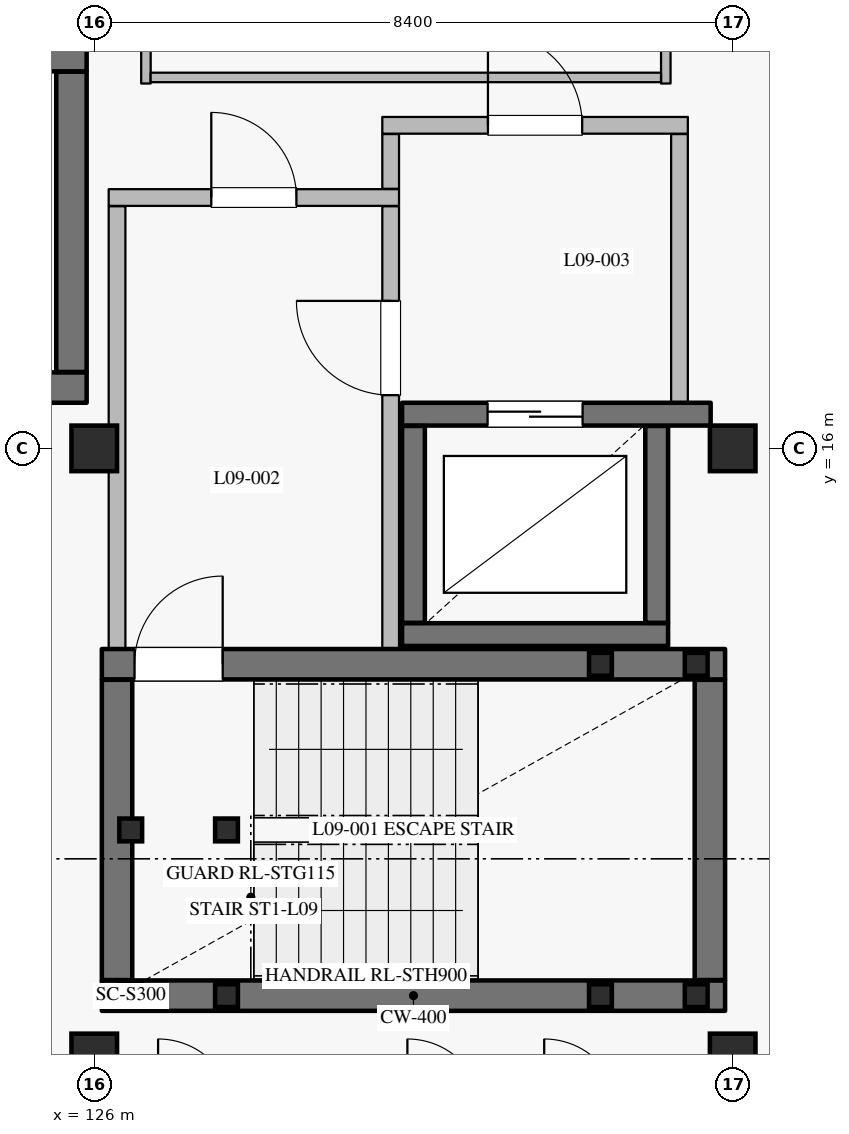
"""IFC4 building model, lengths in metres.
Left out: names, types, materials, properties, quantities, classifications, styles, units other than length and angle.
Written with IfcOpenShell. Run it as: python <this file> out.ifc"""

import sys

from ifc_helpers import new_model, si_unit, direction, frame, frame_2d, origin, origin_2d, place, context, subcontext, project, spatial, rectangle, hollow_rectangle, extrude, element, fill, save


model = new_model("IFC4")
c1 = context("Model", 3, precision=1e-05, world=origin(), true_north=direction((0.0, 1.0)))
c2 = subcontext(c1, "Body", "Model", "MODEL_VIEW")
j1 = project(units=[si_unit("LENGTHUNIT", "METRE"), si_unit("PLANEANGLEUNIT", "RADIAN")], contexts=[c1])
p1 = place(None, origin())
s1 = spatial("IfcSite", under=j1, at=p1, CompositionType="ELEMENT")
p2 = place(p1, origin())
s2 = spatial("IfcBuilding", under=s1, at=p2, CompositionType="ELEMENT")
p3 = place(p2, frame((0.0, 0.0, 39.6)))
s3 = spatial("IfcBuildingStorey", under=s2, at=p3, CompositionType="ELEMENT", Elevation=39.6)
for number, where, z_axis, x_axis in (
    (1, (126.0, 16.0, 0.0), (0.0, 0.0, 1.0), (1.0, 0.0, 0.0)),
    (2, (134.4, 16.0, 0.0), (0.0, 0.0, 1.0), (1.0, 0.0, 0.0)),
    (3, (126.0, 8.0, 0.0), (0.0, 0.0, 1.0), (1.0, 0.0, 0.0)),
    (4, (134.4, 8.0, 0.0), (0.0, 0.0, 1.0), (1.0, 0.0, 0.0)),
):
    element("IfcColumn", number, at=place(p3, frame(where, z_axis=z_axis, x_axis=x_axis)), inside=s3, PredefinedType="COLUMN", context=c2, shape_type="SweptSolid", body=[
        extrude(rectangle(XDim=0.6, YDim=0.6, at=origin_2d()), origin(), (0.0, 0.0, 1.0), 3.6),
    ])
p4 = place(p3, frame((130.05, 13.55, 0.0), z_axis=(0.0, 0.0, 1.0), x_axis=(1.0, 0.0, 0.0)))
e5 = element("IfcWall", 5, at=p4, inside=s3, PredefinedType="SHEAR", context=c2, shape_type="SweptSolid", body=[
    extrude(rectangle(XDim=3.5, YDim=0.3, at=frame_2d((1.75, 0.0))), origin(), (0.0, 0.0, 1.0), 3.335),
])
p5 = place(p3, frame((133.4, 13.705, 0.0), z_axis=(0.0, 0.0, 1.0), x_axis=(0.0, 1.0, 0.0)))
e6 = element("IfcWall", 6, at=p5, inside=s3, PredefinedType="SHEAR", context=c2, shape_type="SweptSolid", body=[
    extrude(rectangle(XDim=2.59, YDim=0.3, at=frame_2d((1.295, 0.0))), origin(), (0.0, 0.0, 1.0), 3.335),
])
p6 = place(p3, frame((134.11, 16.45, 0.0), z_axis=(0.0, 0.0, 1.0), x_axis=(-1.0, 0.0, 0.0)))
e7 = element("IfcWall", 7, at=p6, inside=s3, PredefinedType="SHEAR", context=c2, shape_type="SweptSolid", body=[
    extrude(rectangle(XDim=4.06, YDim=0.3, at=frame_2d((2.03, 0.0))), origin(), (0.0, 0.0, 1.0), 3.335),
])
p7 = place(p6, frame((1.685, 0.0, 0.0)))
e8 = element("IfcOpeningElement", 8, at=p7, cuts=e7, PredefinedType="OPENING", context=c2, shape_type="SweptSolid", body=[
    extrude(rectangle(XDim=1.25, YDim=2.25, at=frame_2d((0.625, 1.125))), frame((0.0, 0.16, 0.0), z_axis=(0.0, -1.0, 0.0), x_axis=(1.0, 0.0, 0.0)), (0.0, 0.0, 1.0), 0.32),
])
p8 = place(p3, frame((130.2, 16.295, 0.0), z_axis=(0.0, 0.0, 1.0), x_axis=(0.0, -1.0, 0.0)))
e9 = element("IfcWall", 9, at=p8, inside=s3, PredefinedType="SHEAR", context=c2, shape_type="SweptSolid", body=[
    extrude(rectangle(XDim=2.59, YDim=0.3, at=frame_2d((1.295, 0.0))), origin(), (0.0, 0.0, 1.0), 3.335),
])
p9 = place(p3, frame((126.1, 8.8, 0.0), z_axis=(0.0, 0.0, 1.0), x_axis=(1.0, 0.0, 0.0)))
e10 = element("IfcWall", 10, at=p9, inside=s3, PredefinedType="SHEAR", context=c2, shape_type="SweptSolid", body=[
    extrude(rectangle(XDim=8.2, YDim=0.4, at=frame_2d((4.1, 0.0))), origin(), (0.0, 0.0, 1.0), 3.335),
])
p10 = place(p3, frame((134.1, 9.005, 0.0), z_axis=(0.0, 0.0, 1.0), x_axis=(0.0, 1.0, 0.0)))
e11 = element("IfcWall", 11, at=p10, inside=s3, PredefinedType="SHEAR", context=c2, shape_type="SweptSolid", body=[
    extrude(rectangle(XDim=3.95, YDim=0.4, at=frame_2d((1.975, 0.0))), origin(), (0.0, 0.0, 1.0), 3.335),
])
p11 = place(p3, frame((126.1, 13.16, 0.0), z_axis=(0.0, 0.0, 1.0), x_axis=(1.0, 0.0, 0.0)))
e12 = element("IfcWall", 12, at=p11, inside=s3, PredefinedType="SHEAR", context=c2, shape_type="SweptSolid", body=[
    extrude(rectangle(XDim=8.2, YDim=0.4, at=frame_2d((4.1, 0.0))), origin(), (0.0, 0.0, 1.0), 3.335),
])
p12 = place(p11, frame((0.43, 0.0, 0.0)))
e13 = element("IfcOpeningElement", 13, at=p12, cuts=e12, PredefinedType="OPENING", context=c2, shape_type="SweptSolid", body=[
    extrude(rectangle(XDim=1.16, YDim=2.2, at=frame_2d((0.58, 1.1))), frame((0.0, 0.21, 0.0), z_axis=(0.0, -1.0, 0.0), x_axis=(1.0, 0.0, 0.0)), (0.0, 0.0, 1.0), 0.42),
])
p13 = place(p3, frame((126.3, 9.005, 0.0), z_axis=(0.0, 0.0, 1.0), x_axis=(0.0, 1.0, 0.0)))
e14 = element("IfcWall", 14, at=p13, inside=s3, PredefinedType="SHEAR", context=c2, shape_type="SweptSolid", body=[
    extrude(rectangle(XDim=3.95, YDim=0.4, at=frame_2d((1.975, 0.0))), origin(), (0.0, 0.0, 1.0), 3.335),
])
p14 = place(p3, frame((126.3, 13.365, 0.0), z_axis=(0.0, 0.0, 1.0), x_axis=(0.0, 1.0, 0.0)))
e15 = element("IfcWall", 15, at=p14, inside=s3, PredefinedType="PARTITIONING", context=c2, shape_type="SweptSolid", body=[
    extrude(rectangle(XDim=5.82, YDim=0.22, at=frame_2d((2.91, 0.0))), origin(), (0.0, 0.0, 1.0), 3.335),
])
p15 = place(p3, frame((126.19, 19.3, 0.0), z_axis=(0.0, 0.0, 1.0), x_axis=(1.0, 0.0, 0.0)))
e16 = element("IfcWall", 16, at=p15, inside=s3, PredefinedType="PARTITIONING", context=c2, shape_type="SweptSolid", body=[
    extrude(rectangle(XDim=3.82, YDim=0.22, at=frame_2d((1.91, 0.0))), origin(), (0.0, 0.0, 1.0), 3.335),
])
p16 = place(p15, frame((1.35, 0.0, 0.0)))
e17 = element("IfcOpeningElement", 17, at=p16, cuts=e16, PredefinedType="OPENING", context=c2, shape_type="SweptSolid", body=[
    extrude(rectangle(XDim=1.12, YDim=2.2, at=frame_2d((0.56, 1.1))), frame((0.0, 0.12, 0.0), z_axis=(0.0, -1.0, 0.0), x_axis=(1.0, 0.0, 0.0)), (0.0, 0.0, 1.0), 0.24),
])
p17 = place(p3, frame((129.9, 13.365, 0.0), z_axis=(0.0, 0.0, 1.0), x_axis=(0.0, 1.0, 0.0)))
e18 = element("IfcWall", 18, at=p17, inside=s3, PredefinedType="PARTITIONING", context=c2, shape_type="SweptSolid", body=[
    extrude(rectangle(XDim=5.82, YDim=0.22, at=frame_2d((2.91, 0.0))), origin(), (0.0, 0.0, 1.0), 3.335),
])
p18 = place(p17, frame((3.335, 0.0, 0.0)))
e19 = element("IfcOpeningElement", 19, at=p18, cuts=e18, PredefinedType="OPENING", context=c2, shape_type="SweptSolid", body=[
    extrude(rectangle(XDim=1.24, YDim=2.2, at=frame_2d((0.62, 1.1))), frame((0.0, 0.12, 0.0), z_axis=(0.0, -1.0, 0.0), x_axis=(1.0, 0.0, 0.0)), (0.0, 0.0, 1.0), 0.24),
])
p19 = place(p3, frame((129.9, 19.415, 0.0), z_axis=(0.0, 0.0, 1.0), x_axis=(0.0, 1.0, 0.0)))
e20 = element("IfcWall", 20, at=p19, inside=s3, PredefinedType="PARTITIONING", context=c2, shape_type="SweptSolid", body=[
    extrude(rectangle(XDim=0.72, YDim=0.22, at=frame_2d((0.36, 0.0))), origin(), (0.0, 0.0, 1.0), 3.335),
])
p20 = place(p3, frame((133.7, 16.605, 0.0), z_axis=(0.0, 0.0, 1.0), x_axis=(0.0, 1.0, 0.0)))
e21 = element("IfcWall", 21, at=p20, inside=s3, PredefinedType="PARTITIONING", context=c2, shape_type="SweptSolid", body=[
    extrude(rectangle(XDim=3.53, YDim=0.22, at=frame_2d((1.765, 0.0))), origin(), (0.0, 0.0, 1.0), 3.335),
])
p21 = place(p3, frame((129.79, 20.25, 0.0), z_axis=(0.0, 0.0, 1.0), x_axis=(1.0, 0.0, 0.0)))
e22 = element("IfcWall", 22, at=p21, inside=s3, PredefinedType="PARTITIONING", context=c2, shape_type="SweptSolid", body=[
    extrude(rectangle(XDim=4.02, YDim=0.22, at=frame_2d((2.01, 0.0))), origin(), (0.0, 0.0, 1.0), 3.335),
])
p22 = place(p21, frame((1.39, 0.0, 0.0)))
e23 = element("IfcOpeningElement", 23, at=p22, cuts=e22, PredefinedType="OPENING", context=c2, shape_type="SweptSolid", body=[
    extrude(rectangle(XDim=1.24, YDim=2.2, at=frame_2d((0.62, 1.1))), frame((0.0, 0.12, 0.0), z_axis=(0.0, -1.0, 0.0), x_axis=(1.0, 0.0, 0.0)), (0.0, 0.0, 1.0), 0.24),
])
for number, where, z_axis, x_axis in (
    (24, (126.48, 8.8, 0.0), (0.0, 0.0, 1.0), (1.0, 0.0, 0.0)),
    (25, (126.48, 10.98, 0.0), (0.0, 0.0, 1.0), (1.0, 0.0, 0.0)),
    (26, (127.74, 8.8, 0.0), (0.0, 0.0, 1.0), (1.0, 0.0, 0.0)),
    (27, (127.74, 10.98, 0.0), (0.0, 0.0, 1.0), (1.0, 0.0, 0.0)),
    (28, (132.66, 8.8, -1.8), (0.0, 0.0, 1.0), (1.0, 0.0, 0.0)),
    (29, (132.66, 13.16, -1.8), (0.0, 0.0, 1.0), (1.0, 0.0, 0.0)),
    (30, (133.92, 8.8, -1.8), (0.0, 0.0, 1.0), (1.0, 0.0, 0.0)),
    (31, (133.92, 13.16, -1.8), (0.0, 0.0, 1.0), (1.0, 0.0, 0.0)),
):
    element("IfcColumn", number, at=place(p3, frame(where, z_axis=z_axis, x_axis=x_axis)), inside=s3, PredefinedType="COLUMN", context=c2, shape_type="SweptSolid", body=[
        extrude(hollow_rectangle(XDim=0.3, YDim=0.3, WallThickness=0.012, at=origin_2d()), origin(), (0.0, 0.0, 1.0), 3.42),
    ])
p23 = place(p3, frame((117.75, 16.8, 0.0), z_axis=(0.0, 0.0, 1.0), x_axis=(1.0, 0.0, 0.0)))
e32 = element("IfcWall", 32, at=p23, inside=s3, PredefinedType="SHEAR", context=c2, shape_type="SweptSolid", body=[
    extrude(rectangle(XDim=8.15, YDim=0.4, at=frame_2d((4.075, 0.0))), origin(), (0.0, 0.0, 1.0), 3.335),
])
p24 = place(p3, frame((125.7, 17.005, 0.0), z_axis=(0.0, 0.0, 1.0), x_axis=(0.0, 1.0, 0.0)))
e33 = element("IfcWall", 33, at=p24, inside=s3, PredefinedType="SHEAR", context=c2, shape_type="SweptSolid", body=[
    extrude(rectangle(XDim=3.95, YDim=0.4, at=frame_2d((1.975, 0.0))), origin(), (0.0, 0.0, 1.0), 3.335),
])
p25 = place(p3, frame((117.75, 21.16, 0.0), z_axis=(0.0, 0.0, 1.0), x_axis=(1.0, 0.0, 0.0)))
e34 = element("IfcWall", 34, at=p25, inside=s3, PredefinedType="SHEAR", context=c2, shape_type="SweptSolid", body=[
    extrude(rectangle(XDim=8.15, YDim=0.4, at=frame_2d((4.075, 0.0))), origin(), (0.0, 0.0, 1.0), 3.335),
])
p26 = place(p25, frame((0.38, 0.0, 0.0)))
e35 = element("IfcOpeningElement", 35, at=p26, cuts=e34, PredefinedType="OPENING", context=c2, shape_type="SweptSolid", body=[
    extrude(rectangle(XDim=1.16, YDim=2.2, at=frame_2d((0.58, 1.1))), frame((0.0, 0.21, 0.0), z_axis=(0.0, -1.0, 0.0), x_axis=(1.0, 0.0, 0.0)), (0.0, 0.0, 1.0), 0.42),
])
for number, where, z_axis, x_axis in (
    (36, (126.68, 20.8, 0.0), (0.0, 0.0, 1.0), (0.0, 1.0, 0.0)),
    (37, (133.52, 20.8, 0.0), (0.0, 0.0, 1.0), (0.0, 1.0, 0.0)),
):
    element("IfcWall", number, at=place(p3, frame(where, z_axis=z_axis, x_axis=x_axis)), inside=s3, PredefinedType="PARTITIONING", context=c2, shape_type="SweptSolid", body=[
        extrude(rectangle(XDim=2.796, YDim=0.125, at=frame_2d((1.398, 0.0))), origin(), (0.0, 0.0, 1.0), 3.335),
    ])
p27 = place(p3, frame((126.742, 20.88, 0.0), z_axis=(0.0, 0.0, 1.0), x_axis=(1.0, 0.0, 0.0)))
e38 = element("IfcWall", 38, at=p27, inside=s3, PredefinedType="PARTITIONING", context=c2, shape_type="SweptSolid", body=[
    extrude(rectangle(XDim=6.715, YDim=0.125, at=frame_2d((3.357, 0.0))), origin(), (0.0, 0.0, 1.0), 3.335),
])
p28 = place(p7, origin())
e39 = element("IfcDoor", 39, at=p28, inside=s3, OperationType="DOUBLE_DOOR_SLIDING", PredefinedType="DOOR", context=c2, shape_type="SweptSolid", body=[
    extrude(rectangle(XDim=1.25, YDim=2.25, at=frame_2d((0.625, 1.125))), frame((0.0, 0.025, 0.0), z_axis=(0.0, -1.0, 0.0), x_axis=(1.0, 0.0, 0.0)), (0.0, 0.0, 1.0), 0.05),
])
fill(e8, e39)
p29 = place(p12, origin())
e40 = element("IfcDoor", 40, at=p29, inside=s3, OperationType="SINGLE_SWING_RIGHT", PredefinedType="DOOR", context=c2, shape_type="SweptSolid", body=[
    extrude(rectangle(XDim=1.16, YDim=2.2, at=frame_2d((0.58, 1.1))), frame((0.0, 0.025, 0.0), z_axis=(0.0, -1.0, 0.0), x_axis=(1.0, 0.0, 0.0)), (0.0, 0.0, 1.0), 0.05),
])
fill(e13, e40)
p30 = place(p16, origin())
e41 = element("IfcDoor", 41, at=p30, inside=s3, OperationType="SINGLE_SWING_LEFT", PredefinedType="DOOR", context=c2, shape_type="SweptSolid", body=[
    extrude(rectangle(XDim=1.12, YDim=2.2, at=frame_2d((0.56, 1.1))), frame((0.0, 0.025, 0.0), z_axis=(0.0, -1.0, 0.0), x_axis=(1.0, 0.0, 0.0)), (0.0, 0.0, 1.0), 0.05),
])
fill(e17, e41)
p31 = place(p18, origin())
e42 = element("IfcDoor", 42, at=p31, inside=s3, OperationType="SINGLE_SWING_RIGHT", PredefinedType="DOOR", context=c2, shape_type="SweptSolid", body=[
    extrude(rectangle(XDim=1.24, YDim=2.2, at=frame_2d((0.62, 1.1))), frame((0.0, 0.025, 0.0), z_axis=(0.0, -1.0, 0.0), x_axis=(1.0, 0.0, 0.0)), (0.0, 0.0, 1.0), 0.05),
])
fill(e19, e42)
p32 = place(p22, origin())
e43 = element("IfcDoor", 43, at=p32, inside=s3, OperationType="SINGLE_SWING_LEFT", PredefinedType="DOOR", context=c2, shape_type="SweptSolid", body=[
    extrude(rectangle(XDim=1.24, YDim=2.2, at=frame_2d((0.62, 1.1))), frame((0.0, 0.025, 0.0), z_axis=(0.0, -1.0, 0.0), x_axis=(1.0, 0.0, 0.0)), (0.0, 0.0, 1.0), 0.05),
])
fill(e23, e43)
save(model, sys.argv[1])
